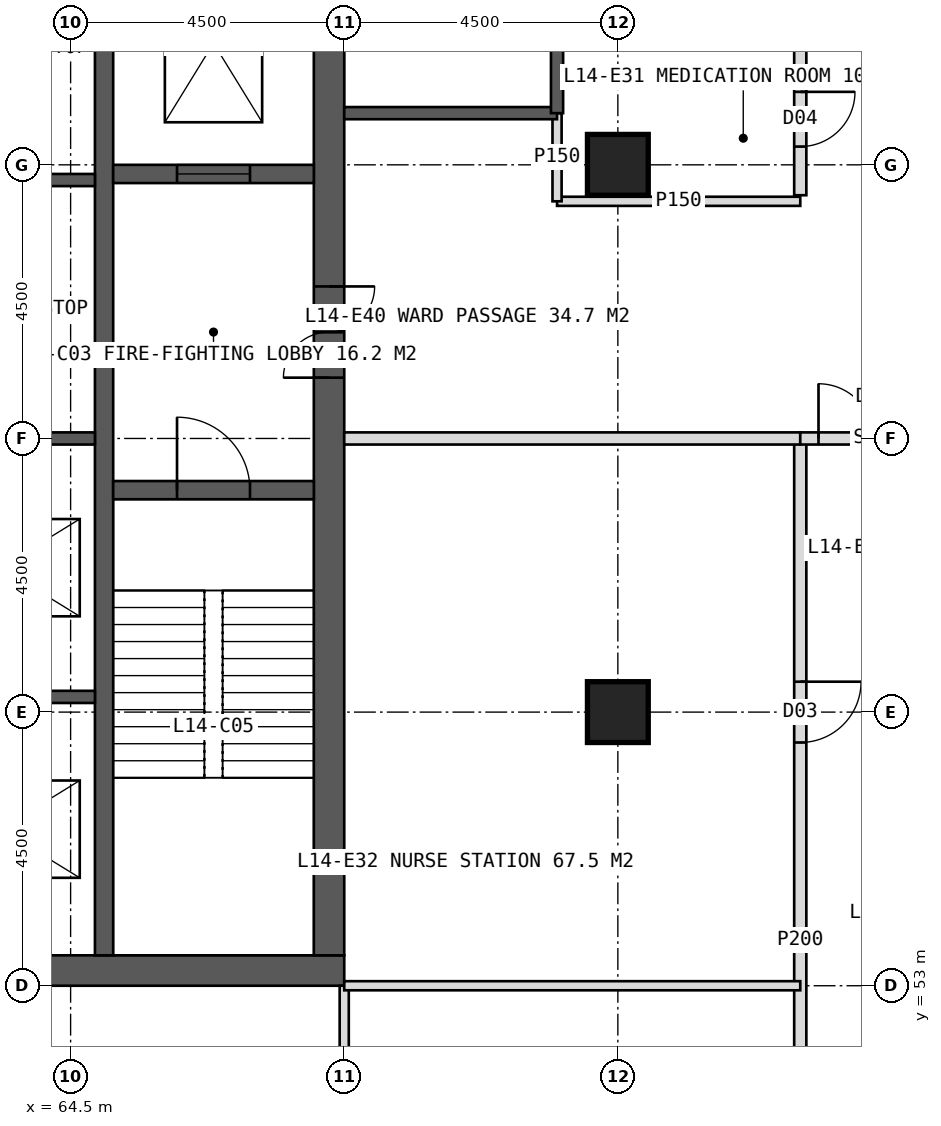
"""IFC4 building model, lengths in metres.
Left out: names, types, materials, properties, quantities, classifications, styles, units other than length and angle.
Written with IfcOpenShell. Run it as: python <this file> out.ifc"""

import sys

from ifc_helpers import new_model, si_unit, direction, frame, frame_2d, origin, origin_2d, place, context, subcontext, project, spatial, rectangle, hollow_rectangle, extrude, element, fill, save


model = new_model("IFC4")
c1 = context("Model", 3, precision=1e-05, world=origin(), true_north=direction((0.0, 1.0)))
c2 = subcontext(c1, "Body", "Model", "MODEL_VIEW")
j1 = project(units=[si_unit("LENGTHUNIT", "METRE"), si_unit("PLANEANGLEUNIT", "RADIAN")], contexts=[c1])
p1 = place(None, origin())
s1 = spatial("IfcSite", under=j1, at=p1, CompositionType="ELEMENT")
p2 = place(p1, origin())
s2 = spatial("IfcBuilding", under=s1, at=p2, CompositionType="ELEMENT")
p3 = place(p2, frame((0.0, 0.0, 63.0)))
s3 = spatial("IfcBuildingStorey", under=s2, at=p3, CompositionType="ELEMENT", Elevation=63.0)
p4 = place(p3, frame((51.0, 53.25, 0.0), z_axis=(0.0, 0.0, 1.0), x_axis=(1.0, 0.0, 0.0)))
e1 = element("IfcWall", 1, at=p4, inside=s3, PredefinedType="SHEAR", context=c2, shape_type="SweptSolid", body=[
    extrude(rectangle(XDim=18.0, YDim=0.5, at=frame_2d((9.0, 0.0))), origin(), (0.0, 0.0, 1.0), 4.0),
])
p5 = place(p4, frame((8.1, 0.0, 0.0)))
e2 = element("IfcOpeningElement", 2, at=p5, cuts=e1, PredefinedType="OPENING", context=c2, shape_type="SweptSolid", body=[
    extrude(rectangle(XDim=1.8, YDim=2.2, at=frame_2d((0.9, 1.1))), frame((0.0, 0.26, 0.0), z_axis=(0.0, -1.0, 0.0), x_axis=(1.0, 0.0, 0.0)), (0.0, 0.0, 1.0), 0.52),
])
p6 = place(p3, frame((68.75, 53.5, 0.0), z_axis=(0.0, 0.0, 1.0), x_axis=(0.0, 1.0, 0.0)))
e3 = element("IfcWall", 3, at=p6, inside=s3, PredefinedType="SHEAR", context=c2, shape_type="SweptSolid", body=[
    extrude(rectangle(XDim=17.0, YDim=0.5, at=frame_2d((8.5, 0.0))), origin(), (0.0, 0.0, 1.0), 4.0),
])
p7 = place(p6, frame((9.5, 0.0, 0.0)))
e4 = element("IfcOpeningElement", 4, at=p7, cuts=e3, PredefinedType="OPENING", context=c2, shape_type="SweptSolid", body=[
    extrude(rectangle(XDim=1.5, YDim=2.2, at=frame_2d((0.75, 1.1))), frame((0.0, 0.26, 0.0), z_axis=(0.0, -1.0, 0.0), x_axis=(1.0, 0.0, 0.0)), (0.0, 0.0, 1.0), 0.52),
])
p8 = place(p3, frame((65.05, 53.5, 0.0), z_axis=(0.0, 0.0, 1.0), x_axis=(0.0, 1.0, 0.0)))
e5 = element("IfcWall", 5, at=p8, inside=s3, PredefinedType="SHEAR", context=c2, shape_type="SweptSolid", body=[
    extrude(rectangle(XDim=17.0, YDim=0.3, at=frame_2d((8.5, 0.0))), origin(), (0.0, 0.0, 1.0), 4.0),
])
for number, where, z_axis, x_axis in (
    (6, (61.85, 57.75, 0.0), (0.0, 0.0, 1.0), (1.0, 0.0, 0.0)),
    (7, (61.85, 62.0, 0.0), (0.0, 0.0, 1.0), (1.0, 0.0, 0.0)),
    (8, (61.85, 66.25, 0.0), (0.0, 0.0, 1.0), (1.0, 0.0, 0.0)),
):
    element("IfcWall", number, at=place(p3, frame(where, z_axis=z_axis, x_axis=x_axis)), inside=s3, PredefinedType="SHEAR", context=c2, shape_type="SweptSolid", body=[
        extrude(rectangle(XDim=3.05, YDim=0.2, at=frame_2d((1.525, 0.0))), origin(), (0.0, 0.0, 1.0), 4.0),
    ])
p9 = place(p3, frame((65.2, 61.15, 0.0), z_axis=(0.0, 0.0, 1.0), x_axis=(1.0, 0.0, 0.0)))
e9 = element("IfcWall", 9, at=p9, inside=s3, PredefinedType="SHEAR", context=c2, shape_type="SweptSolid", body=[
    extrude(rectangle(XDim=3.3, YDim=0.3, at=frame_2d((1.65, 0.0))), origin(), (0.0, 0.0, 1.0), 4.0),
])
p10 = place(p9, frame((1.05, 0.0, 0.0)))
e10 = element("IfcOpeningElement", 10, at=p10, cuts=e9, PredefinedType="OPENING", context=c2, shape_type="SweptSolid", body=[
    extrude(rectangle(XDim=1.2, YDim=2.1, at=frame_2d((0.6, 1.05))), frame((0.0, 0.16, 0.0), z_axis=(0.0, -1.0, 0.0), x_axis=(1.0, 0.0, 0.0)), (0.0, 0.0, 1.0), 0.32),
])
p11 = place(p3, frame((65.2, 66.35, 0.0), z_axis=(0.0, 0.0, 1.0), x_axis=(1.0, 0.0, 0.0)))
e11 = element("IfcWall", 11, at=p11, inside=s3, PredefinedType="SHEAR", context=c2, shape_type="SweptSolid", body=[
    extrude(rectangle(XDim=3.3, YDim=0.3, at=frame_2d((1.65, 0.0))), origin(), (0.0, 0.0, 1.0), 4.0),
])
p12 = place(p11, frame((1.05, 0.0, 0.0)))
e12 = element("IfcOpeningElement", 12, at=p12, cuts=e11, PredefinedType="OPENING", context=c2, shape_type="SweptSolid", body=[
    extrude(rectangle(XDim=1.2, YDim=2.2, at=frame_2d((0.6, 1.1))), frame((0.0, 0.16, 0.0), z_axis=(0.0, -1.0, 0.0), x_axis=(1.0, 0.0, 0.0)), (0.0, 0.0, 1.0), 0.32),
])
for number, where, z_axis, x_axis in (
    (13, (73.5, 57.5, 0.0), (0.0, 0.0, 1.0), (1.0, 0.0, 0.0)),
    (14, (73.5, 66.5, 0.0), (0.0, 0.0, 1.0), (1.0, 0.0, 0.0)),
):
    element("IfcColumn", number, at=place(p3, frame(where, z_axis=z_axis, x_axis=x_axis)), inside=s3, PredefinedType="COLUMN", context=c2, shape_type="SweptSolid", body=[
        extrude(hollow_rectangle(XDim=1.0, YDim=1.0, WallThickness=0.1, at=origin_2d()), origin(), (0.0, 0.0, 1.0), 4.0),
    ])
p13 = place(p3, frame((69.0, 53.0, 0.0), z_axis=(0.0, 0.0, 1.0), x_axis=(0.0, -1.0, 0.0)))
e15 = element("IfcWall", 15, at=p13, inside=s3, PredefinedType="PARTITIONING", context=c2, shape_type="SweptSolid", body=[
    extrude(rectangle(XDim=7.5, YDim=0.15, at=frame_2d((3.75, 0.0))), origin(), (0.0, 0.0, 1.0), 3.75),
])
p14 = place(p3, frame((76.5, 78.5, 0.0), z_axis=(0.0, 0.0, 1.0), x_axis=(0.0, -1.0, 0.0)))
e16 = element("IfcWall", 16, at=p14, inside=s3, PredefinedType="PARTITIONING", context=c2, shape_type="SweptSolid", body=[
    extrude(rectangle(XDim=12.5, YDim=0.2, at=frame_2d((6.25, 0.0))), origin(), (0.0, 0.0, 1.0), 3.75),
])
p15 = place(p14, frame((8.3, 0.0, 0.0)))
e17 = element("IfcOpeningElement", 17, at=p15, cuts=e16, PredefinedType="OPENING", context=c2, shape_type="SweptSolid", body=[
    extrude(rectangle(XDim=0.9, YDim=2.1, at=frame_2d((0.45, 1.05))), frame((0.0, 0.11, 0.0), z_axis=(0.0, -1.0, 0.0), x_axis=(1.0, 0.0, 0.0)), (0.0, 0.0, 1.0), 0.22),
])
p16 = place(p14, frame((10.8, 0.0, 0.0)))
e18 = element("IfcOpeningElement", 18, at=p16, cuts=e16, PredefinedType="OPENING", context=c2, shape_type="SweptSolid", body=[
    extrude(rectangle(XDim=0.9, YDim=2.1, at=frame_2d((0.45, 1.05))), frame((0.0, 0.11, 0.0), z_axis=(0.0, -1.0, 0.0), x_axis=(1.0, 0.0, 0.0)), (0.0, 0.0, 1.0), 0.22),
])
p17 = place(p3, frame((76.5, 62.0, 0.0), z_axis=(0.0, 0.0, 1.0), x_axis=(0.0, -1.0, 0.0)))
e19 = element("IfcWall", 19, at=p17, inside=s3, PredefinedType="PARTITIONING", context=c2, shape_type="SweptSolid", body=[
    extrude(rectangle(XDim=16.5, YDim=0.2, at=frame_2d((8.25, 0.0))), origin(), (0.0, 0.0, 1.0), 3.75),
])
p18 = place(p17, frame((4.0, 0.0, 0.0)))
e20 = element("IfcOpeningElement", 20, at=p18, cuts=e19, PredefinedType="OPENING", context=c2, shape_type="SweptSolid", body=[
    extrude(rectangle(XDim=1.0, YDim=2.1, at=frame_2d((0.5, 1.05))), frame((0.0, 0.11, 0.0), z_axis=(0.0, -1.0, 0.0), x_axis=(1.0, 0.0, 0.0)), (0.0, 0.0, 1.0), 0.22),
])
p19 = place(p17, frame((12.25, 0.0, 0.0)))
e21 = element("IfcOpeningElement", 21, at=p19, cuts=e19, PredefinedType="OPENING", context=c2, shape_type="SweptSolid", body=[
    extrude(rectangle(XDim=1.0, YDim=2.1, at=frame_2d((0.5, 1.05))), frame((0.0, 0.11, 0.0), z_axis=(0.0, -1.0, 0.0), x_axis=(1.0, 0.0, 0.0)), (0.0, 0.0, 1.0), 0.22),
])
p20 = place(p3, frame((72.5, 65.9, 0.0), z_axis=(0.0, 0.0, 1.0), x_axis=(1.0, 0.0, 0.0)))
e22 = element("IfcWall", 22, at=p20, inside=s3, PredefinedType="PARTITIONING", context=c2, shape_type="SweptSolid", body=[
    extrude(rectangle(XDim=4.0, YDim=0.15, at=frame_2d((2.0, 0.0))), origin(), (0.0, 0.0, 1.0), 3.75),
])
p21 = place(p3, frame((69.0, 62.0, 0.0), z_axis=(0.0, 0.0, 1.0), x_axis=(1.0, 0.0, 0.0)))
e23 = element("IfcWall", 23, at=p21, inside=s3, PredefinedType="SOLIDWALL", context=c2, shape_type="SweptSolid", body=[
    extrude(rectangle(XDim=7.5, YDim=0.2, at=frame_2d((3.75, 0.0))), origin(), (0.0, 0.0, 1.0), 2.75),
])
p22 = place(p3, frame((69.0, 53.0, 0.0), z_axis=(0.0, 0.0, 1.0), x_axis=(1.0, 0.0, 0.0)))
e24 = element("IfcWall", 24, at=p22, inside=s3, PredefinedType="PARTITIONING", context=c2, shape_type="SweptSolid", body=[
    extrude(rectangle(XDim=7.5, YDim=0.15, at=frame_2d((3.75, 0.0))), origin(), (0.0, 0.0, 1.0), 3.75),
])
p23 = place(p3, frame((76.5, 62.0, 0.0), z_axis=(0.0, 0.0, 1.0), x_axis=(1.0, 0.0, 0.0)))
e25 = element("IfcWall", 25, at=p23, inside=s3, PredefinedType="SOLIDWALL", context=c2, shape_type="SweptSolid", body=[
    extrude(rectangle(XDim=2.7, YDim=0.2, at=frame_2d((1.35, 0.0))), origin(), (0.0, 0.0, 1.0), 2.75),
])
p24 = place(p23, frame((0.3, 0.0, 0.0)))
e26 = element("IfcOpeningElement", 26, at=p24, cuts=e25, PredefinedType="OPENING", context=c2, shape_type="SweptSolid", body=[
    extrude(rectangle(XDim=1.8, YDim=2.2, at=frame_2d((0.9, 1.1))), frame((0.0, 0.11, 0.0), z_axis=(0.0, -1.0, 0.0), x_axis=(1.0, 0.0, 0.0)), (0.0, 0.0, 1.0), 0.22),
])
p25 = place(p3, frame((72.5, 65.9, 0.0), z_axis=(0.0, 0.0, 1.0), x_axis=(0.0, 1.0, 0.0)))
e27 = element("IfcWall", 27, at=p25, inside=s3, PredefinedType="PARTITIONING", context=c2, shape_type="SweptSolid", body=[
    extrude(rectangle(XDim=1.45, YDim=0.15, at=frame_2d((0.725, 0.0))), origin(), (0.0, 0.0, 1.0), 3.75),
])
p26 = place(p3, frame((69.0, 67.35, 0.0), z_axis=(0.0, 0.0, 1.0), x_axis=(1.0, 0.0, 0.0)))
e28 = element("IfcWall", 28, at=p26, inside=s3, PredefinedType="SOLIDWALL", context=c2, shape_type="SweptSolid", body=[
    extrude(rectangle(XDim=3.5, YDim=0.2, at=frame_2d((1.75, 0.0))), origin(), (0.0, 0.0, 1.0), 3.75),
])
p27 = place(p3, frame((72.5, 67.35, 0.0), z_axis=(0.0, 0.0, 1.0), x_axis=(0.0, 1.0, 0.0)))
e29 = element("IfcWall", 29, at=p27, inside=s3, PredefinedType="SOLIDWALL", context=c2, shape_type="SweptSolid", body=[
    extrude(rectangle(XDim=7.75, YDim=0.2, at=frame_2d((3.875, 0.0))), origin(), (0.0, 0.0, 1.0), 3.75),
])
p28 = place(p16, origin())
e30 = element("IfcDoor", 30, at=p28, inside=s3, OperationType="SINGLE_SWING_LEFT", PredefinedType="DOOR", context=c2, shape_type="SweptSolid", body=[
    extrude(rectangle(XDim=0.9, YDim=2.1, at=frame_2d((0.45, 1.05))), frame((0.0, 0.025, 0.0), z_axis=(0.0, -1.0, 0.0), x_axis=(1.0, 0.0, 0.0)), (0.0, 0.0, 1.0), 0.05),
])
fill(e18, e30)
p29 = place(p18, origin())
e31 = element("IfcDoor", 31, at=p29, inside=s3, OperationType="SINGLE_SWING_LEFT", PredefinedType="DOOR", context=c2, shape_type="SweptSolid", body=[
    extrude(rectangle(XDim=1.0, YDim=2.1, at=frame_2d((0.5, 1.05))), frame((0.0, 0.025, 0.0), z_axis=(0.0, -1.0, 0.0), x_axis=(1.0, 0.0, 0.0)), (0.0, 0.0, 1.0), 0.05),
])
fill(e20, e31)
p30 = place(p24, origin())
e32 = element("IfcDoor", 32, at=p30, inside=s3, OperationType="DOUBLE_DOOR_DOUBLE_SWING", PredefinedType="DOOR", context=c2, shape_type="SweptSolid", body=[
    extrude(rectangle(XDim=1.8, YDim=2.2, at=frame_2d((0.9, 1.1))), frame((0.0, 0.025, 0.0), z_axis=(0.0, -1.0, 0.0), x_axis=(1.0, 0.0, 0.0)), (0.0, 0.0, 1.0), 0.05),
])
fill(e26, e32)
p31 = place(p7, origin())
e33 = element("IfcDoor", 33, at=p31, inside=s3, OperationType="DOUBLE_DOOR_SINGLE_SWING", PredefinedType="DOOR", context=c2, shape_type="SweptSolid", body=[
    extrude(rectangle(XDim=1.5, YDim=2.2, at=frame_2d((0.75, 1.1))), frame((0.0, 0.025, 0.0), z_axis=(0.0, -1.0, 0.0), x_axis=(1.0, 0.0, 0.0)), (0.0, 0.0, 1.0), 0.05),
])
fill(e4, e33)
p32 = place(p10, origin())
e34 = element("IfcDoor", 34, at=p32, inside=s3, OperationType="SINGLE_SWING_LEFT", PredefinedType="DOOR", context=c2, shape_type="SweptSolid", body=[
    extrude(rectangle(XDim=1.2, YDim=2.1, at=frame_2d((0.6, 1.05))), frame((0.0, 0.025, 0.0), z_axis=(0.0, -1.0, 0.0), x_axis=(1.0, 0.0, 0.0)), (0.0, 0.0, 1.0), 0.05),
])
fill(e10, e34)
p33 = place(p12, origin())
e35 = element("IfcDoor", 35, at=p33, inside=s3, OperationType="SLIDING_TO_LEFT", PredefinedType="DOOR", context=c2, shape_type="SweptSolid", body=[
    extrude(rectangle(XDim=1.2, YDim=2.2, at=frame_2d((0.6, 1.1))), frame((0.0, 0.025, 0.0), z_axis=(0.0, -1.0, 0.0), x_axis=(1.0, 0.0, 0.0)), (0.0, 0.0, 1.0), 0.05),
])
fill(e12, e35)
save(model, sys.argv[1])
